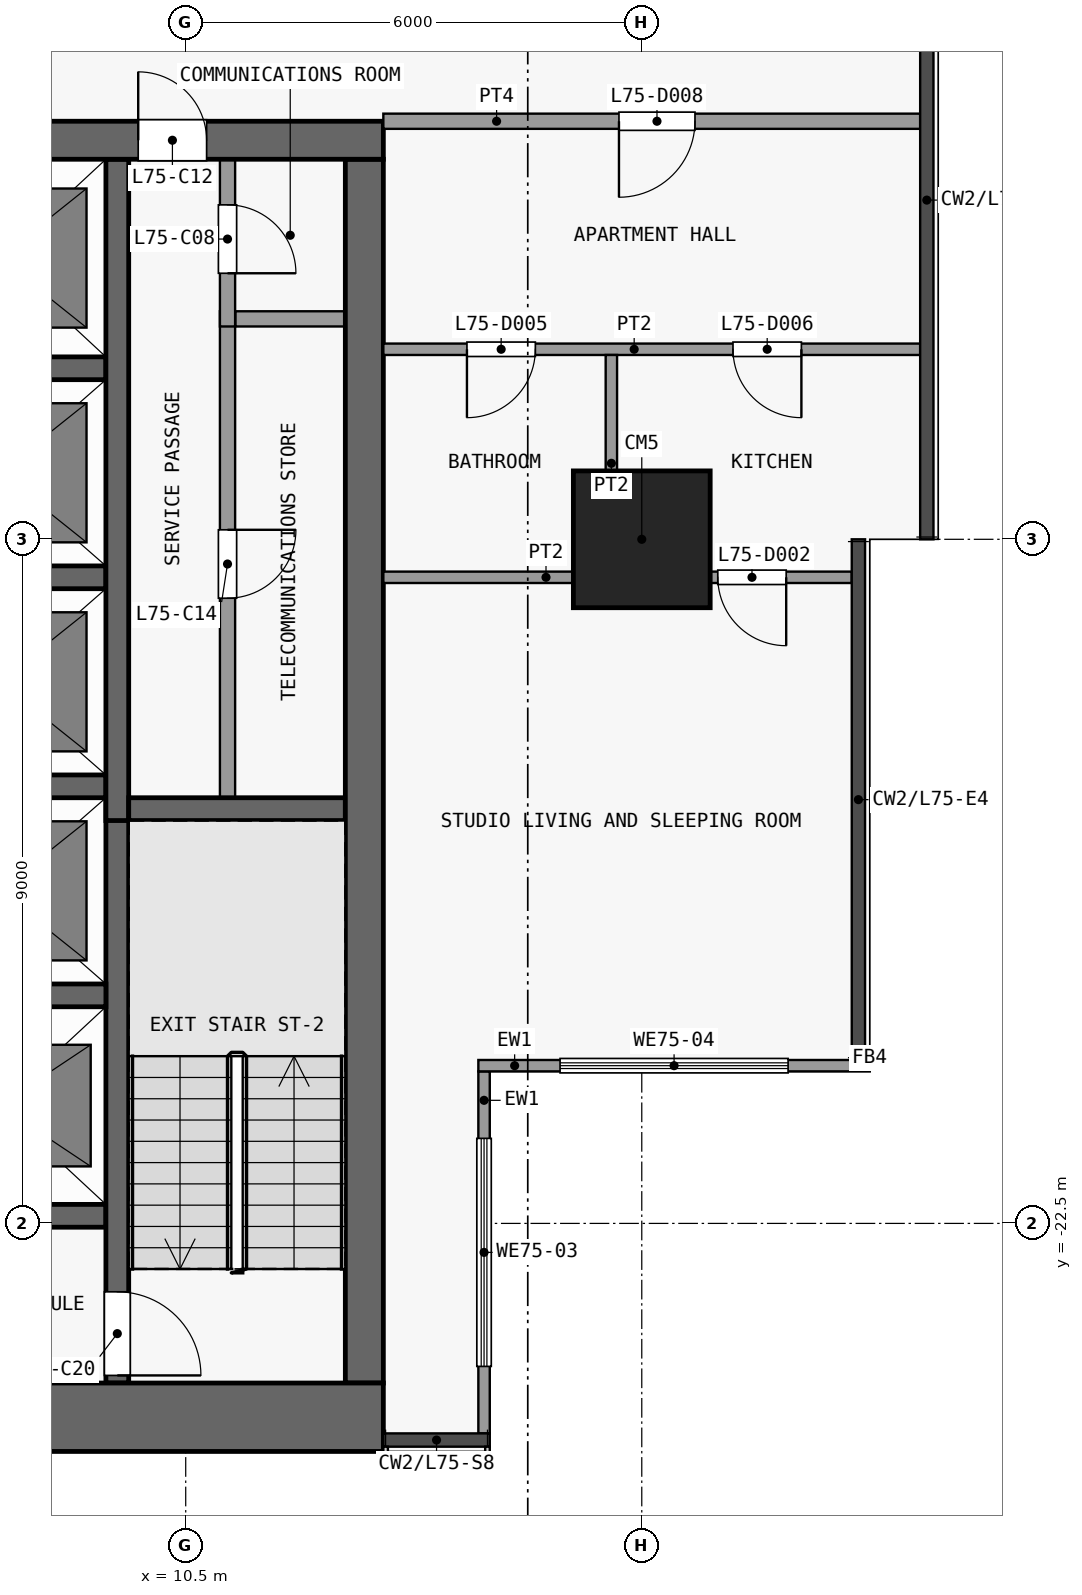
"""IFC4 building model, lengths in metres.
Left out: names, types, materials, properties, quantities, classifications, styles, units other than length and angle.
Written with IfcOpenShell. Run it as: python <this file> out.ifc"""

import sys

from ifc_helpers import new_model, si_unit, direction, frame, frame_2d, origin, origin_2d, place, context, subcontext, project, spatial, rectangle, extrude, element, fill, save


model = new_model("IFC4")
c1 = context("Model", 3, precision=1e-05, world=origin(), true_north=direction((0.0, 1.0)))
c2 = subcontext(c1, "Body", "Model", "MODEL_VIEW")
j1 = project(units=[si_unit("LENGTHUNIT", "METRE"), si_unit("PLANEANGLEUNIT", "RADIAN")], contexts=[c1])
p1 = place(None, origin())
s1 = spatial("IfcSite", under=j1, at=p1, CompositionType="ELEMENT")
p2 = place(p1, origin())
s2 = spatial("IfcBuilding", under=s1, at=p2, CompositionType="ELEMENT")
p3 = place(p2, frame((0.0, 0.0, 295.1)))
s3 = spatial("IfcBuildingStorey", under=s2, at=p3, CompositionType="ELEMENT", Elevation=295.1)
p4 = place(p3, frame((16.5, -13.5, 0.0), z_axis=(0.0, 0.0, 1.0), x_axis=(1.0, 0.0, 0.0)))
e1 = element("IfcColumn", 1, at=p4, inside=s3, PredefinedType="COLUMN", context=c2, shape_type="SweptSolid", body=[
    extrude(rectangle(XDim=1.8, YDim=1.8, at=origin_2d()), origin(), (0.0, 0.0, 1.0), 3.6),
])
p5 = place(p3, frame((-13.1, -25.05, 0.0), z_axis=(0.0, 0.0, 1.0), x_axis=(1.0, 0.0, 0.0)))
e2 = element("IfcWall", 2, at=p5, inside=s3, PredefinedType="SHEAR", context=c2, shape_type="SweptSolid", body=[
    extrude(rectangle(XDim=26.2, YDim=0.9, at=frame_2d((13.1, 0.0))), origin(), (0.0, 0.0, 1.0), 3.2),
])
p6 = place(p3, frame((-13.1, -8.25, 0.0), z_axis=(0.0, 0.0, 1.0), x_axis=(1.0, 0.0, 0.0)))
e3 = element("IfcWall", 3, at=p6, inside=s3, PredefinedType="SHEAR", context=c2, shape_type="SweptSolid", body=[
    extrude(rectangle(XDim=26.2, YDim=0.5, at=frame_2d((13.1, 0.0))), origin(), (0.0, 0.0, 1.0), 3.2),
])
p7 = place(p6, frame((7.4, 0.0, 0.0)))
e4 = element("IfcOpeningElement", 4, at=p7, cuts=e3, PredefinedType="OPENING", context=c2, shape_type="SweptSolid", body=[
    extrude(rectangle(XDim=1.8, YDim=2.1, at=frame_2d((0.9, 1.05))), frame((0.0, 0.26, 0.0), z_axis=(0.0, -1.0, 0.0), x_axis=(1.0, 0.0, 0.0)), (0.0, 0.0, 1.0), 0.52),
])
p8 = place(p6, frame((17.0, 0.0, 0.0)))
e5 = element("IfcOpeningElement", 5, at=p8, cuts=e3, PredefinedType="OPENING", context=c2, shape_type="SweptSolid", body=[
    extrude(rectangle(XDim=1.8, YDim=2.1, at=frame_2d((0.9, 1.05))), frame((0.0, 0.26, 0.0), z_axis=(0.0, -1.0, 0.0), x_axis=(1.0, 0.0, 0.0)), (0.0, 0.0, 1.0), 0.52),
])
p9 = place(p6, frame((2.325, 0.0, 0.0)))
e6 = element("IfcOpeningElement", 6, at=p9, cuts=e3, PredefinedType="OPENING", context=c2, shape_type="SweptSolid", body=[
    extrude(rectangle(XDim=0.9, YDim=2.1, at=frame_2d((0.45, 1.05))), frame((0.0, 0.26, 0.0), z_axis=(0.0, -1.0, 0.0), x_axis=(1.0, 0.0, 0.0)), (0.0, 0.0, 1.0), 0.52),
])
p10 = place(p6, frame((22.975, 0.0, 0.0)))
e7 = element("IfcOpeningElement", 7, at=p10, cuts=e3, PredefinedType="OPENING", context=c2, shape_type="SweptSolid", body=[
    extrude(rectangle(XDim=0.9, YDim=2.1, at=frame_2d((0.45, 1.05))), frame((0.0, 0.26, 0.0), z_axis=(0.0, -1.0, 0.0), x_axis=(1.0, 0.0, 0.0)), (0.0, 0.0, 1.0), 0.52),
])
p11 = place(p3, frame((12.85, -24.6, 0.0), z_axis=(0.0, 0.0, 1.0), x_axis=(0.0, 1.0, 0.0)))
e8 = element("IfcWall", 8, at=p11, inside=s3, PredefinedType="SHEAR", context=c2, shape_type="SweptSolid", body=[
    extrude(rectangle(XDim=16.1, YDim=0.5, at=frame_2d((8.05, 0.0))), origin(), (0.0, 0.0, 1.0), 3.2),
])
for number, where, z_axis, x_axis in (
    (9, (6.65, -22.4, 0.0), (0.0, 0.0, 1.0), (1.0, 0.0, 0.0)),
    (10, (6.65, -19.5, 0.0), (0.0, 0.0, 1.0), (1.0, 0.0, 0.0)),
):
    element("IfcWall", number, at=place(p3, frame(where, z_axis=z_axis, x_axis=x_axis)), inside=s3, PredefinedType="SHEAR", context=c2, shape_type="SweptSolid", body=[
        extrude(rectangle(XDim=2.8, YDim=0.3, at=frame_2d((1.4, 0.0))), origin(), (0.0, 0.0, 1.0), 3.2),
    ])
p12 = place(p3, frame((9.75, -17.05, 0.0), z_axis=(0.0, 0.0, 1.0), x_axis=(1.0, 0.0, 0.0)))
e11 = element("IfcWall", 11, at=p12, inside=s3, PredefinedType="SHEAR", context=c2, shape_type="SweptSolid", body=[
    extrude(rectangle(XDim=2.85, YDim=0.3, at=frame_2d((1.425, 0.0))), origin(), (0.0, 0.0, 1.0), 3.2),
])
for number, where, z_axis, x_axis in (
    (12, (6.65, -16.75, 0.0), (0.0, 0.0, 1.0), (1.0, 0.0, 0.0)),
    (13, (6.65, -14.0, 0.0), (0.0, 0.0, 1.0), (1.0, 0.0, 0.0)),
    (14, (6.65, -11.25, 0.0), (0.0, 0.0, 1.0), (1.0, 0.0, 0.0)),
):
    element("IfcWall", number, at=place(p3, frame(where, z_axis=z_axis, x_axis=x_axis)), inside=s3, PredefinedType="SHEAR", context=c2, shape_type="SweptSolid", body=[
        extrude(rectangle(XDim=2.8, YDim=0.3, at=frame_2d((1.4, 0.0))), origin(), (0.0, 0.0, 1.0), 3.2),
    ])
p13 = place(p3, frame((11.15, -10.6, 0.0), z_axis=(0.0, 0.0, 1.0), x_axis=(1.0, 0.0, 0.0)))
e15 = element("IfcWall", 15, at=p13, inside=s3, PredefinedType="PARTITIONING", context=c2, shape_type="SweptSolid", body=[
    extrude(rectangle(XDim=1.45, YDim=0.2, at=frame_2d((0.725, 0.0))), origin(), (0.0, 0.0, 1.0), 3.2),
])
p14 = place(p3, frame((9.6, -16.9, 0.0), z_axis=(0.0, 0.0, 1.0), x_axis=(0.0, -1.0, 0.0)))
e16 = element("IfcWall", 16, at=p14, inside=s3, PredefinedType="SHEAR", context=c2, shape_type="SweptSolid", body=[
    extrude(rectangle(XDim=7.7, YDim=0.3, at=frame_2d((3.85, 0.0))), origin(), (0.0, 0.0, 1.0), 3.2),
])
p15 = place(p14, frame((6.5, 0.0, 0.0)))
e17 = element("IfcOpeningElement", 17, at=p15, cuts=e16, PredefinedType="OPENING", context=c2, shape_type="SweptSolid", body=[
    extrude(rectangle(XDim=1.1, YDim=2.1, at=frame_2d((0.55, 1.05))), frame((0.0, 0.16, 0.0), z_axis=(0.0, -1.0, 0.0), x_axis=(1.0, 0.0, 0.0)), (0.0, 0.0, 1.0), 0.32),
])
p16 = place(p3, frame((9.6, -17.2, 0.0), z_axis=(0.0, 0.0, 1.0), x_axis=(0.0, 1.0, 0.0)))
e18 = element("IfcWall", 18, at=p16, inside=s3, PredefinedType="SHEAR", context=c2, shape_type="SweptSolid", body=[
    extrude(rectangle(XDim=8.7, YDim=0.3, at=frame_2d((4.35, 0.0))), origin(), (0.0, 0.0, 1.0), 3.2),
])
p17 = place(p3, frame((11.05, -10.5, 0.0), z_axis=(0.0, 0.0, 1.0), x_axis=(0.0, -1.0, 0.0)))
e19 = element("IfcWall", 19, at=p17, inside=s3, PredefinedType="PARTITIONING", context=c2, shape_type="SweptSolid", body=[
    extrude(rectangle(XDim=6.4, YDim=0.2, at=frame_2d((3.2, 0.0))), origin(), (0.0, 0.0, 1.0), 3.2),
])
p18 = place(p17, frame((2.875, 0.0, 0.0)))
e20 = element("IfcOpeningElement", 20, at=p18, cuts=e19, PredefinedType="OPENING", context=c2, shape_type="SweptSolid", body=[
    extrude(rectangle(XDim=0.9, YDim=2.1, at=frame_2d((0.45, 1.05))), frame((0.0, 0.11, 0.0), z_axis=(0.0, -1.0, 0.0), x_axis=(1.0, 0.0, 0.0)), (0.0, 0.0, 1.0), 0.22),
])
p19 = place(p3, frame((11.05, -8.5, 0.0), z_axis=(0.0, 0.0, 1.0), x_axis=(0.0, -1.0, 0.0)))
e21 = element("IfcWall", 21, at=p19, inside=s3, PredefinedType="PARTITIONING", context=c2, shape_type="SweptSolid", body=[
    extrude(rectangle(XDim=2.2, YDim=0.2, at=frame_2d((1.1, 0.0))), origin(), (0.0, 0.0, 1.0), 3.2),
])
p20 = place(p19, frame((0.6, 0.0, 0.0)))
e22 = element("IfcOpeningElement", 22, at=p20, cuts=e21, PredefinedType="OPENING", context=c2, shape_type="SweptSolid", body=[
    extrude(rectangle(XDim=0.9, YDim=2.1, at=frame_2d((0.45, 1.05))), frame((0.0, 0.11, 0.0), z_axis=(0.0, -1.0, 0.0), x_axis=(1.0, 0.0, 0.0)), (0.0, 0.0, 1.0), 0.22),
])
p21 = place(p3, frame((14.425, -20.5, 0.0), z_axis=(0.0, 0.0, 1.0), x_axis=(0.0, -1.0, 0.0)))
e23 = element("IfcWall", 23, at=p21, inside=s3, PredefinedType="SOLIDWALL", context=c2, shape_type="SweptSolid", body=[
    extrude(rectangle(XDim=4.762, YDim=0.15, at=frame_2d((2.381, 0.0))), origin(), (0.0, 0.0, 1.0), 3.2),
])
p22 = place(p21, frame((0.881, 0.0, 0.9)))
e24 = element("IfcOpeningElement", 24, at=p22, cuts=e23, PredefinedType="OPENING", context=c2, shape_type="SweptSolid", body=[
    extrude(rectangle(XDim=3.0, YDim=2.4, at=frame_2d((1.5, 1.2))), frame((0.0, 0.085, 0.0), z_axis=(0.0, -1.0, 0.0), x_axis=(1.0, 0.0, 0.0)), (0.0, 0.0, 1.0), 0.17),
])
p23 = place(p3, frame((19.5, -20.425, 0.0), z_axis=(0.0, 0.0, 1.0), x_axis=(-1.0, 0.0, 0.0)))
e25 = element("IfcWall", 25, at=p23, inside=s3, PredefinedType="SOLIDWALL", context=c2, shape_type="SweptSolid", body=[
    extrude(rectangle(XDim=5.15, YDim=0.15, at=frame_2d((2.575, 0.0))), origin(), (0.0, 0.0, 1.0), 3.2),
])
p24 = place(p23, frame((1.075, 0.0, 0.9)))
e26 = element("IfcOpeningElement", 26, at=p24, cuts=e25, PredefinedType="OPENING", context=c2, shape_type="SweptSolid", body=[
    extrude(rectangle(XDim=3.0, YDim=2.4, at=frame_2d((1.5, 1.2))), frame((0.0, 0.085, 0.0), z_axis=(0.0, -1.0, 0.0), x_axis=(1.0, 0.0, 0.0)), (0.0, 0.0, 1.0), 0.17),
])
p25 = place(p3, frame((13.1, -14.0, 0.0), z_axis=(0.0, 0.0, 1.0), x_axis=(1.0, 0.0, 0.0)))
e27 = element("IfcWall", 27, at=p25, inside=s3, PredefinedType="PARTITIONING", context=c2, shape_type="SweptSolid", body=[
    extrude(rectangle(XDim=6.162, YDim=0.15, at=frame_2d((3.081, 0.0))), origin(), (0.0, 0.0, 1.0), 3.2),
])
p26 = place(p25, frame((4.4, 0.0, 0.0)))
e28 = element("IfcOpeningElement", 28, at=p26, cuts=e27, PredefinedType="OPENING", context=c2, shape_type="SweptSolid", body=[
    extrude(rectangle(XDim=0.9, YDim=2.1, at=frame_2d((0.45, 1.05))), frame((0.0, 0.085, 0.0), z_axis=(0.0, -1.0, 0.0), x_axis=(1.0, 0.0, 0.0)), (0.0, 0.0, 1.0), 0.17),
])
p27 = place(p3, frame((13.1, -11.0, 0.0), z_axis=(0.0, 0.0, 1.0), x_axis=(1.0, 0.0, 0.0)))
e29 = element("IfcWall", 29, at=p27, inside=s3, PredefinedType="PARTITIONING", context=c2, shape_type="SweptSolid", body=[
    extrude(rectangle(XDim=7.062, YDim=0.15, at=frame_2d((3.531, 0.0))), origin(), (0.0, 0.0, 1.0), 3.2),
])
p28 = place(p27, frame((1.1, 0.0, 0.0)))
e30 = element("IfcOpeningElement", 30, at=p28, cuts=e29, PredefinedType="OPENING", context=c2, shape_type="SweptSolid", body=[
    extrude(rectangle(XDim=0.9, YDim=2.1, at=frame_2d((0.45, 1.05))), frame((0.0, 0.085, 0.0), z_axis=(0.0, -1.0, 0.0), x_axis=(1.0, 0.0, 0.0)), (0.0, 0.0, 1.0), 0.17),
])
p29 = place(p27, frame((4.6, 0.0, 0.0)))
e31 = element("IfcOpeningElement", 31, at=p29, cuts=e29, PredefinedType="OPENING", context=c2, shape_type="SweptSolid", body=[
    extrude(rectangle(XDim=0.9, YDim=2.1, at=frame_2d((0.45, 1.05))), frame((0.0, 0.085, 0.0), z_axis=(0.0, -1.0, 0.0), x_axis=(1.0, 0.0, 0.0)), (0.0, 0.0, 1.0), 0.17),
])
p30 = place(p3, frame((13.1, -8.0, 0.0), z_axis=(0.0, 0.0, 1.0), x_axis=(1.0, 0.0, 0.0)))
e32 = element("IfcWall", 32, at=p30, inside=s3, PredefinedType="PARTITIONING", context=c2, shape_type="SweptSolid", body=[
    extrude(rectangle(XDim=7.062, YDim=0.2, at=frame_2d((3.531, 0.0))), origin(), (0.0, 0.0, 1.0), 3.2),
])
p31 = place(p30, frame((3.1, 0.0, 0.0)))
e33 = element("IfcOpeningElement", 33, at=p31, cuts=e32, PredefinedType="OPENING", context=c2, shape_type="SweptSolid", body=[
    extrude(rectangle(XDim=1.0, YDim=2.1, at=frame_2d((0.5, 1.05))), frame((0.0, 0.11, 0.0), z_axis=(0.0, -1.0, 0.0), x_axis=(1.0, 0.0, 0.0)), (0.0, 0.0, 1.0), 0.22),
])
p32 = place(p3, frame((16.1, -13.925, 0.0), z_axis=(0.0, 0.0, 1.0), x_axis=(0.0, 1.0, 0.0)))
e34 = element("IfcWall", 34, at=p32, inside=s3, PredefinedType="PARTITIONING", context=c2, shape_type="SweptSolid", body=[
    extrude(rectangle(XDim=2.85, YDim=0.15, at=frame_2d((1.425, 0.0))), origin(), (0.0, 0.0, 1.0), 3.2),
])
p33 = place(p20, origin())
e35 = element("IfcDoor", 35, at=p33, inside=s3, OperationType="SINGLE_SWING_RIGHT", PredefinedType="DOOR", context=c2, shape_type="SweptSolid", body=[
    extrude(rectangle(XDim=0.9, YDim=2.1, at=frame_2d((0.45, 1.05))), frame((0.0, 0.025, 0.0), z_axis=(0.0, -1.0, 0.0), x_axis=(1.0, 0.0, 0.0)), (0.0, 0.0, 1.0), 0.05),
])
fill(e22, e35)
p34 = place(p10, origin())
e36 = element("IfcDoor", 36, at=p34, inside=s3, OperationType="SINGLE_SWING_LEFT", PredefinedType="DOOR", context=c2, shape_type="SweptSolid", body=[
    extrude(rectangle(XDim=0.9, YDim=2.1, at=frame_2d((0.45, 1.05))), frame((0.0, 0.025, 0.0), z_axis=(0.0, -1.0, 0.0), x_axis=(1.0, 0.0, 0.0)), (0.0, 0.0, 1.0), 0.05),
])
fill(e7, e36)
p35 = place(p18, origin())
e37 = element("IfcDoor", 37, at=p35, inside=s3, OperationType="SINGLE_SWING_LEFT", PredefinedType="DOOR", context=c2, shape_type="SweptSolid", body=[
    extrude(rectangle(XDim=0.9, YDim=2.1, at=frame_2d((0.45, 1.05))), frame((0.0, 0.025, 0.0), z_axis=(0.0, -1.0, 0.0), x_axis=(1.0, 0.0, 0.0)), (0.0, 0.0, 1.0), 0.05),
])
fill(e20, e37)
p36 = place(p15, origin())
e38 = element("IfcDoor", 38, at=p36, inside=s3, OperationType="SINGLE_SWING_RIGHT", PredefinedType="DOOR", context=c2, shape_type="SweptSolid", body=[
    extrude(rectangle(XDim=1.1, YDim=2.1, at=frame_2d((0.55, 1.05))), frame((0.0, 0.025, 0.0), z_axis=(0.0, -1.0, 0.0), x_axis=(1.0, 0.0, 0.0)), (0.0, 0.0, 1.0), 0.05),
])
fill(e17, e38)
p37 = place(p22, origin())
e39 = element("IfcWindow", 39, at=p37, inside=s3, PartitioningType="SINGLE_PANEL", PredefinedType="WINDOW", context=c2, shape_type="SweptSolid", body=[
    extrude(rectangle(XDim=3.0, YDim=2.4, at=frame_2d((1.5, 1.2))), frame((0.0, 0.03, 0.0), z_axis=(0.0, -1.0, 0.0), x_axis=(1.0, 0.0, 0.0)), (0.0, 0.0, 1.0), 0.06),
])
fill(e24, e39)
p38 = place(p24, origin())
e40 = element("IfcWindow", 40, at=p38, inside=s3, PartitioningType="SINGLE_PANEL", PredefinedType="WINDOW", context=c2, shape_type="SweptSolid", body=[
    extrude(rectangle(XDim=3.0, YDim=2.4, at=frame_2d((1.5, 1.2))), frame((0.0, 0.03, 0.0), z_axis=(0.0, -1.0, 0.0), x_axis=(1.0, 0.0, 0.0)), (0.0, 0.0, 1.0), 0.06),
])
fill(e26, e40)
p39 = place(p26, origin())
e41 = element("IfcDoor", 41, at=p39, inside=s3, OperationType="SINGLE_SWING_RIGHT", PredefinedType="DOOR", context=c2, shape_type="SweptSolid", body=[
    extrude(rectangle(XDim=0.9, YDim=2.1, at=frame_2d((0.45, 1.05))), frame((0.0, 0.025, 0.0), z_axis=(0.0, -1.0, 0.0), x_axis=(1.0, 0.0, 0.0)), (0.0, 0.0, 1.0), 0.05),
])
fill(e28, e41)
p40 = place(p28, origin())
e42 = element("IfcDoor", 42, at=p40, inside=s3, OperationType="SINGLE_SWING_LEFT", PredefinedType="DOOR", context=c2, shape_type="SweptSolid", body=[
    extrude(rectangle(XDim=0.9, YDim=2.1, at=frame_2d((0.45, 1.05))), frame((0.0, 0.025, 0.0), z_axis=(0.0, -1.0, 0.0), x_axis=(1.0, 0.0, 0.0)), (0.0, 0.0, 1.0), 0.05),
])
fill(e30, e42)
p41 = place(p29, origin())
e43 = element("IfcDoor", 43, at=p41, inside=s3, OperationType="SINGLE_SWING_RIGHT", PredefinedType="DOOR", context=c2, shape_type="SweptSolid", body=[
    extrude(rectangle(XDim=0.9, YDim=2.1, at=frame_2d((0.45, 1.05))), frame((0.0, 0.025, 0.0), z_axis=(0.0, -1.0, 0.0), x_axis=(1.0, 0.0, 0.0)), (0.0, 0.0, 1.0), 0.05),
])
fill(e31, e43)
p42 = place(p31, origin())
e44 = element("IfcDoor", 44, at=p42, inside=s3, OperationType="SINGLE_SWING_LEFT", PredefinedType="DOOR", context=c2, shape_type="SweptSolid", body=[
    extrude(rectangle(XDim=1.0, YDim=2.1, at=frame_2d((0.5, 1.05))), frame((0.0, 0.025, 0.0), z_axis=(0.0, -1.0, 0.0), x_axis=(1.0, 0.0, 0.0)), (0.0, 0.0, 1.0), 0.05),
])
fill(e33, e44)
save(model, sys.argv[1])
